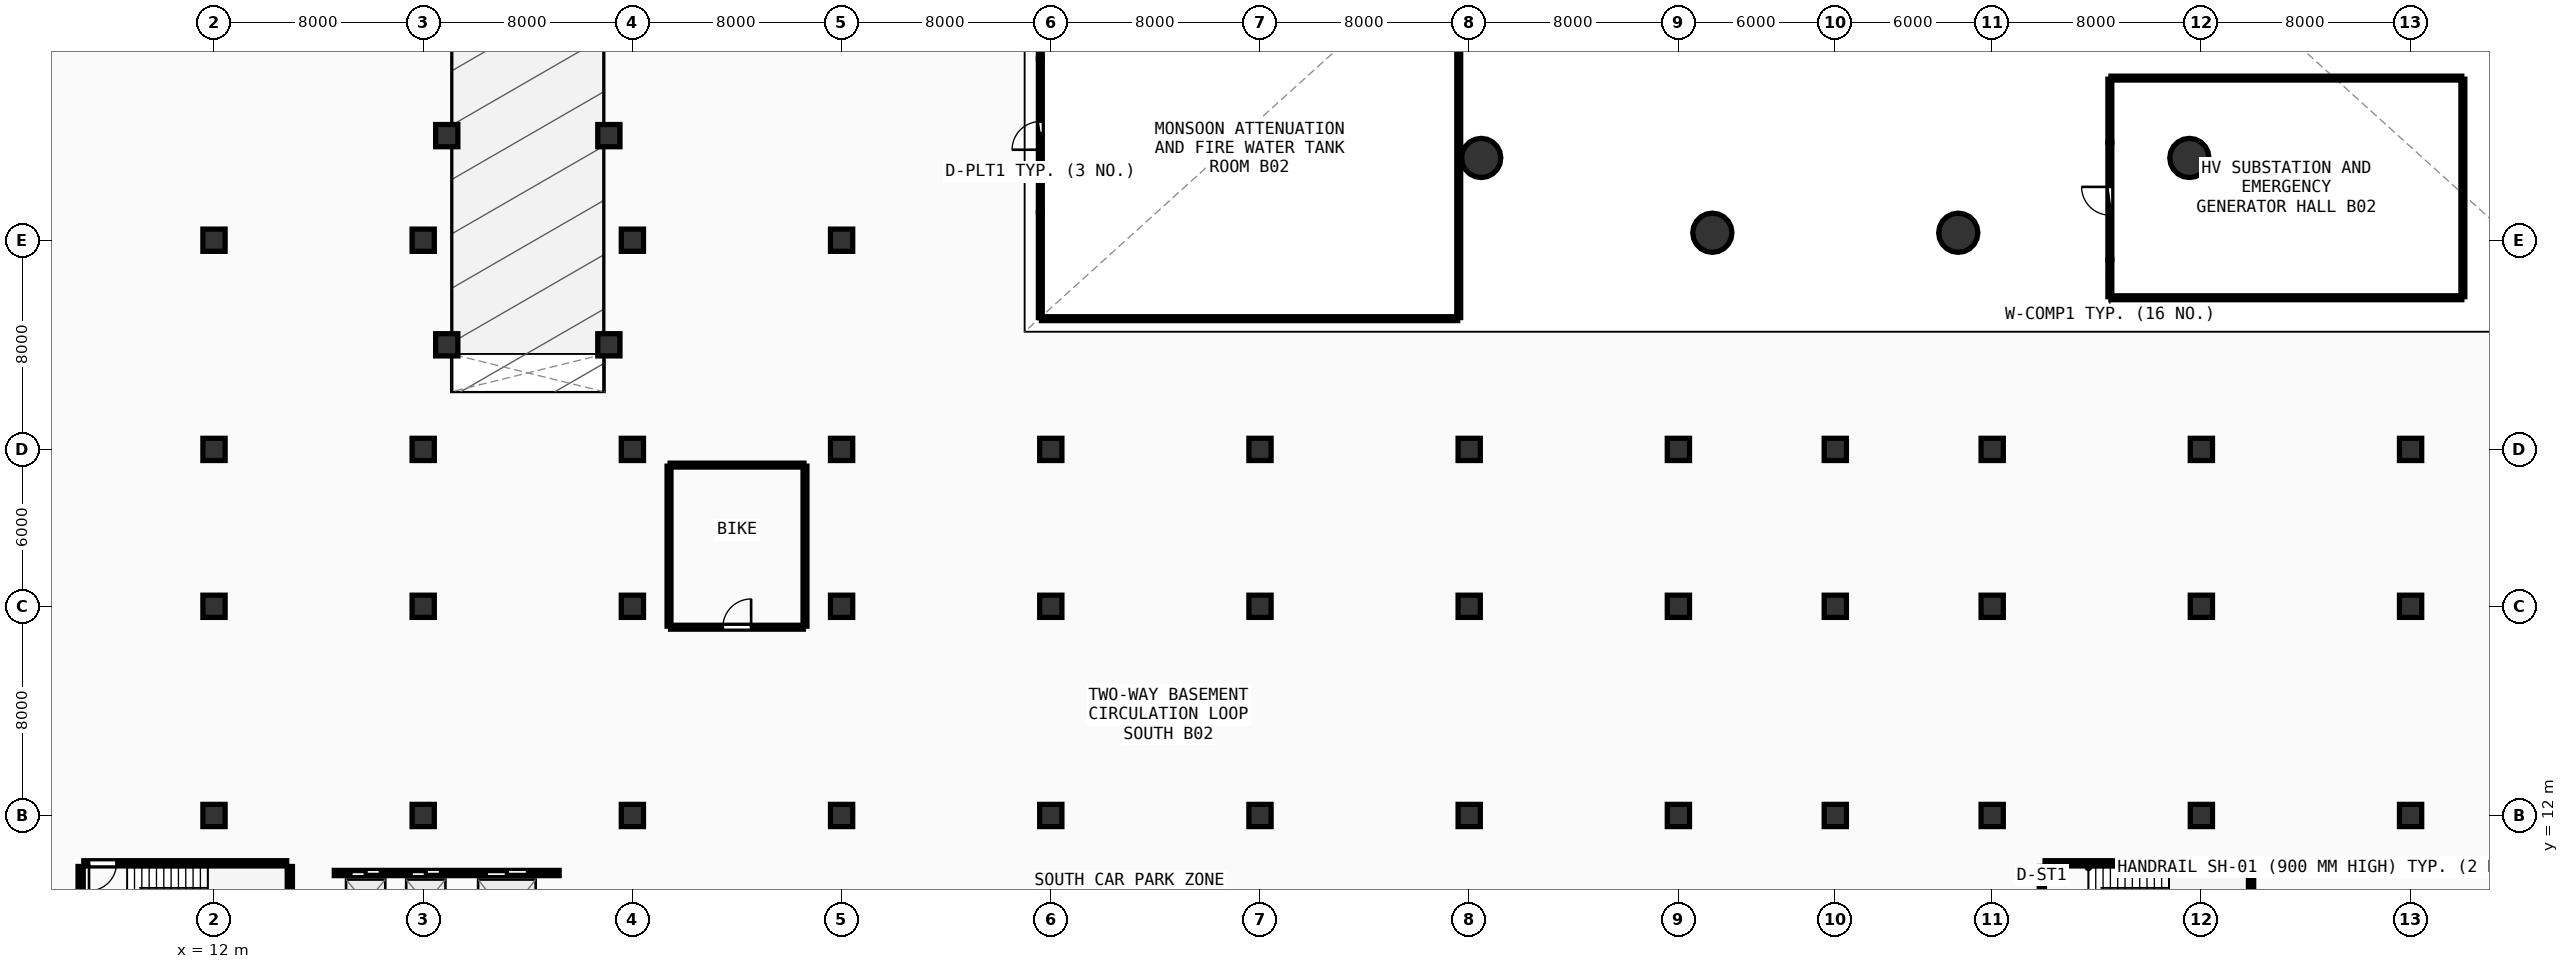
"""IFC4 building model, lengths in metres.
Left out: names, types, materials, properties, quantities, classifications, styles, units other than length and angle.
Written with IfcOpenShell. Run it as: python <this file> out.ifc"""

import sys

from ifc_helpers import new_model, si_unit, direction, frame, frame_2d, origin, origin_2d, place, context, subcontext, project, spatial, rectangle, circle, extrude, element, fill, save


model = new_model("IFC4")
c1 = context("Model", 3, precision=1e-05, world=origin(), true_north=direction((0.0, 1.0)))
c2 = subcontext(c1, "Body", "Model", "MODEL_VIEW")
j1 = project(units=[si_unit("LENGTHUNIT", "METRE"), si_unit("PLANEANGLEUNIT", "RADIAN")], contexts=[c1])
p1 = place(None, origin())
s1 = spatial("IfcSite", under=j1, at=p1, CompositionType="ELEMENT")
p2 = place(p1, origin())
s2 = spatial("IfcBuilding", under=s1, at=p2, CompositionType="ELEMENT")
p3 = place(p2, frame((0.0, 0.0, -8.4)))
s3 = spatial("IfcBuildingStorey", under=s2, at=p3, CompositionType="ELEMENT", Elevation=-8.4)
for number, where, z_axis, x_axis in (
    (1, (60.46, 37.146, 0.0), (0.0, 0.0, 1.0), (1.0, 0.0, 0.0)),
    (2, (69.298, 34.286, 0.0), (0.0, 0.0, 1.0), (1.0, 0.0, 0.0)),
    (3, (78.702, 34.286, 0.0), (0.0, 0.0, 1.0), (1.0, 0.0, 0.0)),
    (4, (87.54, 37.146, 0.0), (0.0, 0.0, 1.0), (1.0, 0.0, 0.0)),
):
    element("IfcColumn", number, at=place(p3, frame(where, z_axis=z_axis, x_axis=x_axis)), inside=s3, PredefinedType="COLUMN", context=c2, shape_type="SweptSolid", body=[
        extrude(circle(Radius=0.75, at=origin_2d()), origin(), (0.0, 0.0, 1.0), 4.2),
    ])
for number, where, z_axis, x_axis in (
    (5, (12.0, 12.0, 0.0), (0.0, 0.0, 1.0), (1.0, 0.0, 0.0)),
    (6, (12.0, 20.0, 0.0), (0.0, 0.0, 1.0), (1.0, 0.0, 0.0)),
    (7, (12.0, 26.0, 0.0), (0.0, 0.0, 1.0), (1.0, 0.0, 0.0)),
    (8, (12.0, 34.0, 0.0), (0.0, 0.0, 1.0), (1.0, 0.0, 0.0)),
    (9, (20.0, 12.0, 0.0), (0.0, 0.0, 1.0), (1.0, 0.0, 0.0)),
    (10, (20.0, 20.0, 0.0), (0.0, 0.0, 1.0), (1.0, 0.0, 0.0)),
    (11, (20.0, 26.0, 0.0), (0.0, 0.0, 1.0), (1.0, 0.0, 0.0)),
    (12, (20.0, 34.0, 0.0), (0.0, 0.0, 1.0), (1.0, 0.0, 0.0)),
    (13, (28.0, 12.0, 0.0), (0.0, 0.0, 1.0), (1.0, 0.0, 0.0)),
    (14, (28.0, 20.0, 0.0), (0.0, 0.0, 1.0), (1.0, 0.0, 0.0)),
    (15, (28.0, 26.0, 0.0), (0.0, 0.0, 1.0), (1.0, 0.0, 0.0)),
    (16, (28.0, 34.0, 0.0), (0.0, 0.0, 1.0), (1.0, 0.0, 0.0)),
    (17, (36.0, 12.0, 0.0), (0.0, 0.0, 1.0), (1.0, 0.0, 0.0)),
    (18, (36.0, 20.0, 0.0), (0.0, 0.0, 1.0), (1.0, 0.0, 0.0)),
    (19, (36.0, 26.0, 0.0), (0.0, 0.0, 1.0), (1.0, 0.0, 0.0)),
    (20, (36.0, 34.0, 0.0), (0.0, 0.0, 1.0), (1.0, 0.0, 0.0)),
    (21, (44.0, 12.0, 0.0), (0.0, 0.0, 1.0), (1.0, 0.0, 0.0)),
    (22, (44.0, 20.0, 0.0), (0.0, 0.0, 1.0), (1.0, 0.0, 0.0)),
    (23, (44.0, 26.0, 0.0), (0.0, 0.0, 1.0), (1.0, 0.0, 0.0)),
    (24, (52.0, 12.0, 0.0), (0.0, 0.0, 1.0), (1.0, 0.0, 0.0)),
    (25, (52.0, 20.0, 0.0), (0.0, 0.0, 1.0), (1.0, 0.0, 0.0)),
    (26, (52.0, 26.0, 0.0), (0.0, 0.0, 1.0), (1.0, 0.0, 0.0)),
    (27, (60.0, 12.0, 0.0), (0.0, 0.0, 1.0), (1.0, 0.0, 0.0)),
    (28, (60.0, 20.0, 0.0), (0.0, 0.0, 1.0), (1.0, 0.0, 0.0)),
    (29, (60.0, 26.0, 0.0), (0.0, 0.0, 1.0), (1.0, 0.0, 0.0)),
    (30, (68.0, 12.0, 0.0), (0.0, 0.0, 1.0), (1.0, 0.0, 0.0)),
    (31, (68.0, 20.0, 0.0), (0.0, 0.0, 1.0), (1.0, 0.0, 0.0)),
    (32, (68.0, 26.0, 0.0), (0.0, 0.0, 1.0), (1.0, 0.0, 0.0)),
    (33, (74.0, 12.0, 0.0), (0.0, 0.0, 1.0), (1.0, 0.0, 0.0)),
    (34, (74.0, 20.0, 0.0), (0.0, 0.0, 1.0), (1.0, 0.0, 0.0)),
    (35, (74.0, 26.0, 0.0), (0.0, 0.0, 1.0), (1.0, 0.0, 0.0)),
    (36, (80.0, 12.0, 0.0), (0.0, 0.0, 1.0), (1.0, 0.0, 0.0)),
    (37, (80.0, 20.0, 0.0), (0.0, 0.0, 1.0), (1.0, 0.0, 0.0)),
    (38, (80.0, 26.0, 0.0), (0.0, 0.0, 1.0), (1.0, 0.0, 0.0)),
    (39, (88.0, 12.0, 0.0), (0.0, 0.0, 1.0), (1.0, 0.0, 0.0)),
    (40, (88.0, 20.0, 0.0), (0.0, 0.0, 1.0), (1.0, 0.0, 0.0)),
    (41, (88.0, 26.0, 0.0), (0.0, 0.0, 1.0), (1.0, 0.0, 0.0)),
    (42, (96.0, 12.0, 0.0), (0.0, 0.0, 1.0), (1.0, 0.0, 0.0)),
    (43, (96.0, 20.0, 0.0), (0.0, 0.0, 1.0), (1.0, 0.0, 0.0)),
    (44, (96.0, 26.0, 0.0), (0.0, 0.0, 1.0), (1.0, 0.0, 0.0)),
    (45, (20.9, 38.0, 0.0), (0.0, 0.0, 1.0), (1.0, 0.0, 0.0)),
    (46, (27.1, 38.0, 0.0), (0.0, 0.0, 1.0), (1.0, 0.0, 0.0)),
    (47, (20.9, 30.0, 0.0), (0.0, 0.0, 1.0), (1.0, 0.0, 0.0)),
    (48, (27.1, 30.0, 0.0), (0.0, 0.0, 1.0), (1.0, 0.0, 0.0)),
):
    element("IfcColumn", number, at=place(p3, frame(where, z_axis=z_axis, x_axis=x_axis)), inside=s3, PredefinedType="COLUMN", context=c2, shape_type="SweptSolid", body=[
        extrude(rectangle(XDim=0.85, YDim=0.85, at=origin_2d()), origin(), (0.0, 0.0, 1.0), 4.2),
    ])
p4 = place(p3, frame((14.9, 6.58, 0.0), z_axis=(0.0, 0.0, 1.0), x_axis=(0.0, 1.0, 0.0)))
e49 = element("IfcWall", 49, at=p4, inside=s3, PredefinedType="SHEAR", context=c2, shape_type="SweptSolid", body=[
    extrude(rectangle(XDim=3.47, YDim=0.2, at=frame_2d((1.735, 0.0))), origin(), (0.0, 0.0, 1.0), 3.9),
])
p5 = place(p3, frame((14.78, 10.17, 0.0), z_axis=(0.0, 0.0, 1.0), x_axis=(-1.0, 0.0, 0.0)))
e50 = element("IfcWall", 50, at=p5, inside=s3, PredefinedType="SHEAR", context=c2, shape_type="SweptSolid", body=[
    extrude(rectangle(XDim=7.76, YDim=0.2, at=frame_2d((3.88, 0.0))), origin(), (0.0, 0.0, 1.0), 3.9),
])
p6 = place(p5, frame((6.51, 0.0, 0.0)))
e51 = element("IfcOpeningElement", 51, at=p6, cuts=e50, PredefinedType="OPENING", context=c2, shape_type="SweptSolid", body=[
    extrude(rectangle(XDim=1.05, YDim=2.1, at=frame_2d((0.525, 1.05))), frame((0.0, 0.11, 0.0), z_axis=(0.0, -1.0, 0.0), x_axis=(1.0, 0.0, 0.0)), (0.0, 0.0, 1.0), 0.22),
])
for number, where, z_axis, x_axis in (
    (52, (6.9, 10.05, 0.0), (0.0, 0.0, 1.0), (0.0, -1.0, 0.0)),
    (53, (89.9, 6.58, 0.0), (0.0, 0.0, 1.0), (0.0, 1.0, 0.0)),
):
    element("IfcWall", number, at=place(p3, frame(where, z_axis=z_axis, x_axis=x_axis)), inside=s3, PredefinedType="SHEAR", context=c2, shape_type="SweptSolid", body=[
        extrude(rectangle(XDim=3.47, YDim=0.2, at=frame_2d((1.735, 0.0))), origin(), (0.0, 0.0, 1.0), 3.9),
    ])
p7 = place(p3, frame((89.78, 10.17, 0.0), z_axis=(0.0, 0.0, 1.0), x_axis=(-1.0, 0.0, 0.0)))
e54 = element("IfcWall", 54, at=p7, inside=s3, PredefinedType="SHEAR", context=c2, shape_type="SweptSolid", body=[
    extrude(rectangle(XDim=7.76, YDim=0.2, at=frame_2d((3.88, 0.0))), origin(), (0.0, 0.0, 1.0), 3.9),
])
p8 = place(p3, frame((81.9, 10.05, 0.0), z_axis=(0.0, 0.0, 1.0), x_axis=(0.0, -1.0, 0.0)))
e55 = element("IfcWall", 55, at=p8, inside=s3, PredefinedType="SHEAR", context=c2, shape_type="SweptSolid", body=[
    extrude(rectangle(XDim=3.47, YDim=0.2, at=frame_2d((1.735, 0.0))), origin(), (0.0, 0.0, 1.0), 3.9),
])
p9 = place(p8, frame((1.21, 0.0, 0.0)))
e56 = element("IfcOpeningElement", 56, at=p9, cuts=e55, PredefinedType="OPENING", context=c2, shape_type="SweptSolid", body=[
    extrude(rectangle(XDim=1.05, YDim=2.1, at=frame_2d((0.525, 1.05))), frame((0.0, 0.11, 0.0), z_axis=(0.0, -1.0, 0.0), x_axis=(1.0, 0.0, 0.0)), (0.0, 0.0, 1.0), 0.22),
])
p10 = place(p3, frame((16.6, 9.8, 0.0), z_axis=(0.0, 0.0, 1.0), x_axis=(1.0, 0.0, 0.0)))
e57 = element("IfcWall", 57, at=p10, inside=s3, PredefinedType="SOLIDWALL", context=c2, shape_type="SweptSolid", body=[
    extrude(rectangle(XDim=8.6, YDim=0.2, at=frame_2d((4.3, 0.0))), origin(), (0.0, 0.0, 1.0), 2.685),
])
p11 = place(p10, frame((0.65, 0.0, 0.0)))
e58 = element("IfcOpeningElement", 58, at=p11, cuts=e57, PredefinedType="OPENING", context=c2, shape_type="SweptSolid", body=[
    extrude(rectangle(XDim=1.1, YDim=2.1, at=frame_2d((0.55, 1.05))), frame((0.0, 0.11, 0.0), z_axis=(0.0, -1.0, 0.0), x_axis=(1.0, 0.0, 0.0)), (0.0, 0.0, 1.0), 0.22),
])
p12 = place(p10, frame((2.95, 0.0, 0.0)))
e59 = element("IfcOpeningElement", 59, at=p12, cuts=e57, PredefinedType="OPENING", context=c2, shape_type="SweptSolid", body=[
    extrude(rectangle(XDim=1.1, YDim=2.1, at=frame_2d((0.55, 1.05))), frame((0.0, 0.11, 0.0), z_axis=(0.0, -1.0, 0.0), x_axis=(1.0, 0.0, 0.0)), (0.0, 0.0, 1.0), 0.22),
])
p13 = place(p10, frame((5.825, 0.0, 0.0)))
e60 = element("IfcOpeningElement", 60, at=p13, cuts=e57, PredefinedType="OPENING", context=c2, shape_type="SweptSolid", body=[
    extrude(rectangle(XDim=1.55, YDim=2.2, at=frame_2d((0.775, 1.1))), frame((0.0, 0.11, 0.0), z_axis=(0.0, -1.0, 0.0), x_axis=(1.0, 0.0, 0.0)), (0.0, 0.0, 1.0), 0.22),
])
p14 = place(p3, frame((29.46, 19.2, 0.0), z_axis=(0.0, 0.0, 1.0), x_axis=(1.0, 0.0, 0.0)))
e61 = element("IfcWall", 61, at=p14, inside=s3, PredefinedType="PARTITIONING", context=c2, shape_type="SweptSolid", body=[
    extrude(rectangle(XDim=5.08, YDim=0.15, at=frame_2d((2.54, 0.0))), origin(), (0.0, 0.0, 1.0), 3.89),
])
p15 = place(p14, frame((2.0, 0.0, 0.0)))
e62 = element("IfcOpeningElement", 62, at=p15, cuts=e61, PredefinedType="OPENING", context=c2, shape_type="SweptSolid", body=[
    extrude(rectangle(XDim=1.08, YDim=2.1, at=frame_2d((0.54, 1.05))), frame((0.0, 0.085, 0.0), z_axis=(0.0, -1.0, 0.0), x_axis=(1.0, 0.0, 0.0)), (0.0, 0.0, 1.0), 0.17),
])
p16 = place(p3, frame((43.6, 35.06, 0.0), z_axis=(0.0, 0.0, 1.0), x_axis=(0.0, 1.0, 0.0)))
e63 = element("IfcWall", 63, at=p16, inside=s3, PredefinedType="PARTITIONING", context=c2, shape_type="SweptSolid", body=[
    extrude(rectangle(XDim=5.88, YDim=0.15, at=frame_2d((2.94, 0.0))), origin(), (0.0, 0.0, 1.0), 3.89),
])
p17 = place(p16, frame((2.4, 0.0, 0.0)))
e64 = element("IfcOpeningElement", 64, at=p17, cuts=e63, PredefinedType="OPENING", context=c2, shape_type="SweptSolid", body=[
    extrude(rectangle(XDim=1.08, YDim=2.1, at=frame_2d((0.54, 1.05))), frame((0.0, 0.085, 0.0), z_axis=(0.0, -1.0, 0.0), x_axis=(1.0, 0.0, 0.0)), (0.0, 0.0, 1.0), 0.17),
])
p18 = place(p3, frame((84.5, 33.26, 0.0), z_axis=(0.0, 0.0, 1.0), x_axis=(0.0, 1.0, 0.0)))
e65 = element("IfcWall", 65, at=p18, inside=s3, PredefinedType="PARTITIONING", context=c2, shape_type="SweptSolid", body=[
    extrude(rectangle(XDim=4.48, YDim=0.15, at=frame_2d((2.24, 0.0))), origin(), (0.0, 0.0, 1.0), 3.285),
])
p19 = place(p18, frame((1.7, 0.0, 0.0)))
e66 = element("IfcOpeningElement", 66, at=p19, cuts=e65, PredefinedType="OPENING", context=c2, shape_type="SweptSolid", body=[
    extrude(rectangle(XDim=1.08, YDim=2.1, at=frame_2d((0.54, 1.05))), frame((0.0, 0.085, 0.0), z_axis=(0.0, -1.0, 0.0), x_axis=(1.0, 0.0, 0.0)), (0.0, 0.0, 1.0), 0.17),
])
p20 = place(p3, frame((34.6, 19.24, 0.0), z_axis=(0.0, 0.0, 1.0), x_axis=(0.0, 1.0, 0.0)))
e67 = element("IfcWall", 67, at=p20, inside=s3, PredefinedType="PARTITIONING", context=c2, shape_type="SweptSolid", body=[
    extrude(rectangle(XDim=6.12, YDim=0.15, at=frame_2d((3.06, 0.0))), origin(), (0.0, 0.0, 1.0), 2.685),
])
p21 = place(p3, frame((34.56, 25.4, 0.0), z_axis=(0.0, 0.0, 1.0), x_axis=(-1.0, 0.0, 0.0)))
e68 = element("IfcWall", 68, at=p21, inside=s3, PredefinedType="PARTITIONING", context=c2, shape_type="SweptSolid", body=[
    extrude(rectangle(XDim=5.12, YDim=0.15, at=frame_2d((2.56, 0.0))), origin(), (0.0, 0.0, 1.0), 3.89),
])
p22 = place(p3, frame((29.4, 25.36, 0.0), z_axis=(0.0, 0.0, 1.0), x_axis=(0.0, -1.0, 0.0)))
e69 = element("IfcWall", 69, at=p22, inside=s3, PredefinedType="PARTITIONING", context=c2, shape_type="SweptSolid", body=[
    extrude(rectangle(XDim=6.12, YDim=0.15, at=frame_2d((3.06, 0.0))), origin(), (0.0, 0.0, 1.0), 2.685),
])
p23 = place(p3, frame((43.64, 31.0, 0.0), z_axis=(0.0, 0.0, 1.0), x_axis=(1.0, 0.0, 0.0)))
e70 = element("IfcWall", 70, at=p23, inside=s3, PredefinedType="PARTITIONING", context=c2, shape_type="SweptSolid", body=[
    extrude(rectangle(XDim=15.92, YDim=0.15, at=frame_2d((7.96, 0.0))), origin(), (0.0, 0.0, 1.0), 3.89),
])
p24 = place(p3, frame((59.6, 31.04, 0.0), z_axis=(0.0, 0.0, 1.0), x_axis=(0.0, 1.0, 0.0)))
e71 = element("IfcWall", 71, at=p24, inside=s3, PredefinedType="PARTITIONING", context=c2, shape_type="SweptSolid", body=[
    extrude(rectangle(XDim=12.92, YDim=0.15, at=frame_2d((6.46, 0.0))), origin(), (0.0, 0.0, 1.0), 3.285),
])
p25 = place(p3, frame((43.6, 43.96, 0.0), z_axis=(0.0, 0.0, 1.0), x_axis=(0.0, -1.0, 0.0)))
e72 = element("IfcWall", 72, at=p25, inside=s3, PredefinedType="PARTITIONING", context=c2, shape_type="SweptSolid", body=[
    extrude(rectangle(XDim=3.02, YDim=0.15, at=frame_2d((1.51, 0.0))), origin(), (0.0, 0.0, 1.0), 3.89),
])
p26 = place(p3, frame((43.6, 35.06, 0.0), z_axis=(0.0, 0.0, 1.0), x_axis=(0.0, -1.0, 0.0)))
e73 = element("IfcWall", 73, at=p26, inside=s3, PredefinedType="PARTITIONING", context=c2, shape_type="SweptSolid", body=[
    extrude(rectangle(XDim=4.02, YDim=0.15, at=frame_2d((2.01, 0.0))), origin(), (0.0, 0.0, 1.0), 3.89),
])
p27 = place(p3, frame((84.54, 31.8, 0.0), z_axis=(0.0, 0.0, 1.0), x_axis=(1.0, 0.0, 0.0)))
e74 = element("IfcWall", 74, at=p27, inside=s3, PredefinedType="PARTITIONING", context=c2, shape_type="SweptSolid", body=[
    extrude(rectangle(XDim=13.42, YDim=0.15, at=frame_2d((6.71, 0.0))), origin(), (0.0, 0.0, 1.0), 3.89),
])
p28 = place(p3, frame((98.0, 31.84, 0.0), z_axis=(0.0, 0.0, 1.0), x_axis=(0.0, 1.0, 0.0)))
e75 = element("IfcWall", 75, at=p28, inside=s3, PredefinedType="PARTITIONING", context=c2, shape_type="SweptSolid", body=[
    extrude(rectangle(XDim=8.32, YDim=0.15, at=frame_2d((4.16, 0.0))), origin(), (0.0, 0.0, 1.0), 3.89),
])
p29 = place(p3, frame((97.96, 40.2, 0.0), z_axis=(0.0, 0.0, 1.0), x_axis=(-1.0, 0.0, 0.0)))
e76 = element("IfcWall", 76, at=p29, inside=s3, PredefinedType="PARTITIONING", context=c2, shape_type="SweptSolid", body=[
    extrude(rectangle(XDim=13.42, YDim=0.15, at=frame_2d((6.71, 0.0))), origin(), (0.0, 0.0, 1.0), 3.285),
])
p30 = place(p3, frame((84.5, 40.16, 0.0), z_axis=(0.0, 0.0, 1.0), x_axis=(0.0, -1.0, 0.0)))
e77 = element("IfcWall", 77, at=p30, inside=s3, PredefinedType="PARTITIONING", context=c2, shape_type="SweptSolid", body=[
    extrude(rectangle(XDim=2.42, YDim=0.15, at=frame_2d((1.21, 0.0))), origin(), (0.0, 0.0, 1.0), 3.645),
])
p31 = place(p3, frame((84.5, 33.26, 0.0), z_axis=(0.0, 0.0, 1.0), x_axis=(0.0, -1.0, 0.0)))
e78 = element("IfcWall", 78, at=p31, inside=s3, PredefinedType="PARTITIONING", context=c2, shape_type="SweptSolid", body=[
    extrude(rectangle(XDim=1.42, YDim=0.15, at=frame_2d((0.71, 0.0))), origin(), (0.0, 0.0, 1.0), 3.89),
])
p32 = place(p6, origin())
e79 = element("IfcDoor", 79, at=p32, inside=s3, OperationType="SINGLE_SWING_RIGHT", PredefinedType="DOOR", context=c2, shape_type="SweptSolid", body=[
    extrude(rectangle(XDim=1.05, YDim=2.1, at=frame_2d((0.525, 1.05))), frame((0.0, 0.025, 0.0), z_axis=(0.0, -1.0, 0.0), x_axis=(1.0, 0.0, 0.0)), (0.0, 0.0, 1.0), 0.05),
])
fill(e51, e79)
p33 = place(p11, origin())
e80 = element("IfcDoor", 80, at=p33, inside=s3, OperationType="DOUBLE_DOOR_SLIDING", PredefinedType="DOOR", context=c2, shape_type="SweptSolid", body=[
    extrude(rectangle(XDim=1.1, YDim=2.1, at=frame_2d((0.55, 1.05))), frame((0.0, 0.025, 0.0), z_axis=(0.0, -1.0, 0.0), x_axis=(1.0, 0.0, 0.0)), (0.0, 0.0, 1.0), 0.05),
])
fill(e58, e80)
p34 = place(p12, origin())
e81 = element("IfcDoor", 81, at=p34, inside=s3, OperationType="DOUBLE_DOOR_SLIDING", PredefinedType="DOOR", context=c2, shape_type="SweptSolid", body=[
    extrude(rectangle(XDim=1.1, YDim=2.1, at=frame_2d((0.55, 1.05))), frame((0.0, 0.025, 0.0), z_axis=(0.0, -1.0, 0.0), x_axis=(1.0, 0.0, 0.0)), (0.0, 0.0, 1.0), 0.05),
])
fill(e59, e81)
p35 = place(p13, origin())
e82 = element("IfcDoor", 82, at=p35, inside=s3, OperationType="DOUBLE_DOOR_SLIDING", PredefinedType="DOOR", context=c2, shape_type="SweptSolid", body=[
    extrude(rectangle(XDim=1.55, YDim=2.2, at=frame_2d((0.775, 1.1))), frame((0.0, 0.025, 0.0), z_axis=(0.0, -1.0, 0.0), x_axis=(1.0, 0.0, 0.0)), (0.0, 0.0, 1.0), 0.05),
])
fill(e60, e82)
p36 = place(p15, origin())
e83 = element("IfcDoor", 83, at=p36, inside=s3, OperationType="SINGLE_SWING_RIGHT", PredefinedType="DOOR", context=c2, shape_type="SweptSolid", body=[
    extrude(rectangle(XDim=1.08, YDim=2.1, at=frame_2d((0.54, 1.05))), frame((0.0, 0.025, 0.0), z_axis=(0.0, -1.0, 0.0), x_axis=(1.0, 0.0, 0.0)), (0.0, 0.0, 1.0), 0.05),
])
fill(e62, e83)
p37 = place(p17, origin())
e84 = element("IfcDoor", 84, at=p37, inside=s3, OperationType="SINGLE_SWING_LEFT", PredefinedType="DOOR", context=c2, shape_type="SweptSolid", body=[
    extrude(rectangle(XDim=1.08, YDim=2.1, at=frame_2d((0.54, 1.05))), frame((0.0, 0.025, 0.0), z_axis=(0.0, -1.0, 0.0), x_axis=(1.0, 0.0, 0.0)), (0.0, 0.0, 1.0), 0.05),
])
fill(e64, e84)
p38 = place(p19, origin())
e85 = element("IfcDoor", 85, at=p38, inside=s3, OperationType="SINGLE_SWING_RIGHT", PredefinedType="DOOR", context=c2, shape_type="SweptSolid", body=[
    extrude(rectangle(XDim=1.08, YDim=2.1, at=frame_2d((0.54, 1.05))), frame((0.0, 0.025, 0.0), z_axis=(0.0, -1.0, 0.0), x_axis=(1.0, 0.0, 0.0)), (0.0, 0.0, 1.0), 0.05),
])
fill(e66, e85)
save(model, sys.argv[1])
